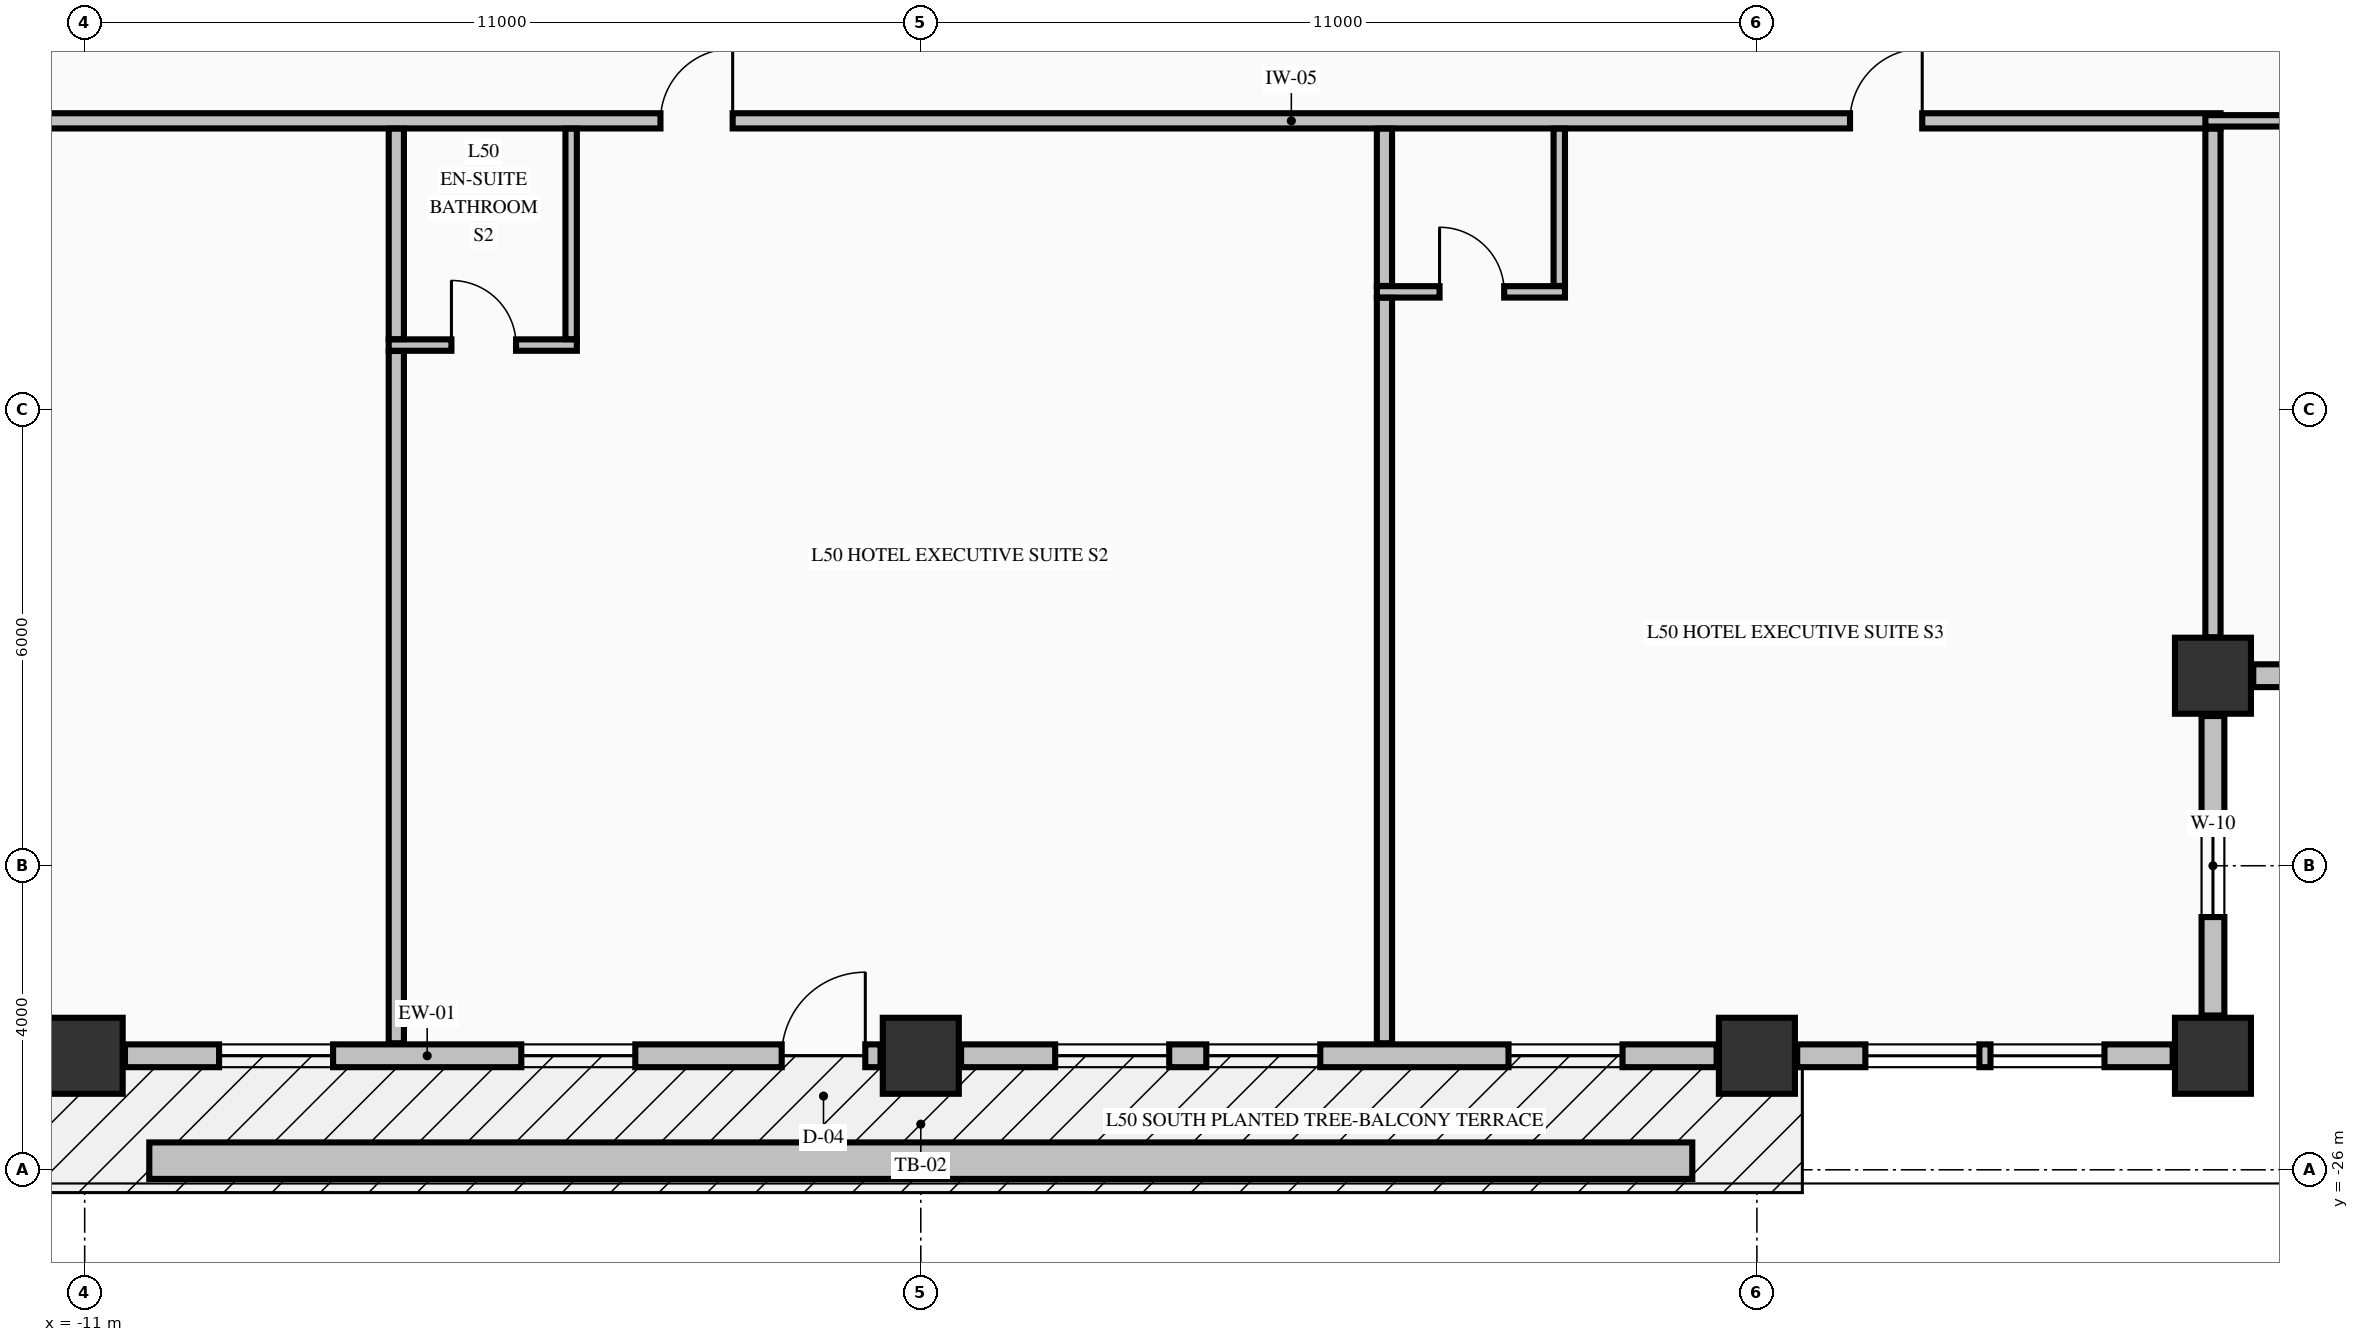
"""IFC4 building model, lengths in metres.
Left out: names, types, materials, properties, quantities, classifications, styles, units other than length and angle.
Written with IfcOpenShell. Run it as: python <this file> out.ifc"""

import sys

from ifc_helpers import new_model, si_unit, direction, frame, frame_2d, origin, origin_2d, place, context, subcontext, project, spatial, rectangle, extrude, element, fill, save


model = new_model("IFC4")
c1 = context("Model", 3, precision=1e-05, world=origin(), true_north=direction((0.0, 1.0)))
c2 = subcontext(c1, "Body", "Model", "MODEL_VIEW")
j1 = project(units=[si_unit("LENGTHUNIT", "METRE"), si_unit("PLANEANGLEUNIT", "RADIAN")], contexts=[c1])
p1 = place(None, origin())
s1 = spatial("IfcSite", under=j1, at=p1, CompositionType="ELEMENT")
p2 = place(p1, origin())
s2 = spatial("IfcBuilding", under=s1, at=p2, CompositionType="ELEMENT")
p3 = place(p2, frame((0.0, 0.0, 194.86)))
s3 = spatial("IfcBuildingStorey", under=s2, at=p3, CompositionType="ELEMENT", Elevation=194.86)
for number, where, z_axis, x_axis in (
    (1, (-11.0, -24.5, -0.275), (0.0, 0.0, 1.0), (1.0, 0.0, 0.0)),
    (2, (0.0, -24.5, -0.275), (0.0, 0.0, 1.0), (1.0, 0.0, 0.0)),
    (3, (11.0, -24.5, -0.275), (0.0, 0.0, 1.0), (1.0, 0.0, 0.0)),
    (4, (17.0, -24.5, -0.275), (0.0, 0.0, 1.0), (1.0, 0.0, 0.0)),
    (5, (17.0, -19.5, -0.275), (0.0, 0.0, 1.0), (1.0, 0.0, 0.0)),
):
    element("IfcColumn", number, at=place(p3, frame(where, z_axis=z_axis, x_axis=x_axis)), inside=s3, PredefinedType="COLUMN", context=c2, shape_type="SweptSolid", body=[
        extrude(rectangle(XDim=1.0, YDim=1.0, at=origin_2d()), origin(), (0.0, 0.0, 1.0), 3.425),
    ])
p4 = place(p3, frame((17.0, -23.97, 0.0), z_axis=(0.0, 0.0, 1.0), x_axis=(0.0, 1.0, 0.0)))
e6 = element("IfcWall", 6, at=p4, inside=s3, PredefinedType="STANDARD", context=c2, shape_type="SweptSolid", body=[
    extrude(rectangle(XDim=3.94, YDim=0.3, at=frame_2d((1.97, 0.0))), origin(), (0.0, 0.0, 1.0), 2.542),
])
p5 = place(p4, frame((1.295, 0.0, 0.68)))
e7 = element("IfcOpeningElement", 7, at=p5, cuts=e6, PredefinedType="OPENING", context=c2, shape_type="SweptSolid", body=[
    extrude(rectangle(XDim=1.35, YDim=1.42, at=frame_2d((0.675, 0.71))), frame((0.0, 0.16, 0.0), z_axis=(0.0, -1.0, 0.0), x_axis=(1.0, 0.0, 0.0)), (0.0, 0.0, 1.0), 0.32),
])
p6 = place(p3, frame((17.53, -19.5, 0.0), z_axis=(0.0, 0.0, 1.0), x_axis=(1.0, 0.0, 0.0)))
e8 = element("IfcWall", 8, at=p6, inside=s3, PredefinedType="STANDARD", context=c2, shape_type="SweptSolid", body=[
    extrude(rectangle(XDim=3.94, YDim=0.3, at=frame_2d((1.97, 0.0))), origin(), (0.0, 0.0, 1.0), 2.542),
])
p7 = place(p6, frame((1.295, 0.0, 0.68)))
e9 = element("IfcOpeningElement", 9, at=p7, cuts=e8, PredefinedType="OPENING", context=c2, shape_type="SweptSolid", body=[
    extrude(rectangle(XDim=1.35, YDim=1.42, at=frame_2d((0.675, 0.71))), frame((0.0, 0.16, 0.0), z_axis=(0.0, -1.0, 0.0), x_axis=(1.0, 0.0, 0.0)), (0.0, 0.0, 1.0), 0.32),
])
p8 = place(p3, frame((-10.47, -24.5, 0.0), z_axis=(0.0, 0.0, 1.0), x_axis=(1.0, 0.0, 0.0)))
e10 = element("IfcWall", 10, at=p8, inside=s3, PredefinedType="STANDARD", context=c2, shape_type="SweptSolid", body=[
    extrude(rectangle(XDim=9.94, YDim=0.3, at=frame_2d((4.97, 0.0))), origin(), (0.0, 0.0, 1.0), 2.542),
])
p9 = place(p8, frame((8.64, 0.0, 0.0)))
e11 = element("IfcOpeningElement", 11, at=p9, cuts=e10, PredefinedType="OPENING", context=c2, shape_type="SweptSolid", body=[
    extrude(rectangle(XDim=1.1, YDim=2.15, at=frame_2d((0.55, 1.075))), frame((0.0, 0.16, 0.0), z_axis=(0.0, -1.0, 0.0), x_axis=(1.0, 0.0, 0.0)), (0.0, 0.0, 1.0), 0.32),
])
p10 = place(p8, frame((1.238, 0.0, 0.72)))
e12 = element("IfcOpeningElement", 12, at=p10, cuts=e10, PredefinedType="OPENING", context=c2, shape_type="SweptSolid", body=[
    extrude(rectangle(XDim=1.5, YDim=1.6, at=frame_2d((0.75, 0.8))), frame((0.0, 0.16, 0.0), z_axis=(0.0, -1.0, 0.0), x_axis=(1.0, 0.0, 0.0)), (0.0, 0.0, 1.0), 0.32),
])
p11 = place(p8, frame((5.214, 0.0, 0.72)))
e13 = element("IfcOpeningElement", 13, at=p11, cuts=e10, PredefinedType="OPENING", context=c2, shape_type="SweptSolid", body=[
    extrude(rectangle(XDim=1.5, YDim=1.6, at=frame_2d((0.75, 0.8))), frame((0.0, 0.16, 0.0), z_axis=(0.0, -1.0, 0.0), x_axis=(1.0, 0.0, 0.0)), (0.0, 0.0, 1.0), 0.32),
])
p12 = place(p3, frame((0.53, -24.5, 0.0), z_axis=(0.0, 0.0, 1.0), x_axis=(1.0, 0.0, 0.0)))
e14 = element("IfcWall", 14, at=p12, inside=s3, PredefinedType="STANDARD", context=c2, shape_type="SweptSolid", body=[
    extrude(rectangle(XDim=9.94, YDim=0.3, at=frame_2d((4.97, 0.0))), origin(), (0.0, 0.0, 1.0), 2.542),
])
p13 = place(p12, frame((1.238, 0.0, 0.72)))
e15 = element("IfcOpeningElement", 15, at=p13, cuts=e14, PredefinedType="OPENING", context=c2, shape_type="SweptSolid", body=[
    extrude(rectangle(XDim=1.5, YDim=1.6, at=frame_2d((0.75, 0.8))), frame((0.0, 0.16, 0.0), z_axis=(0.0, -1.0, 0.0), x_axis=(1.0, 0.0, 0.0)), (0.0, 0.0, 1.0), 0.32),
])
p14 = place(p12, frame((3.226, 0.0, 0.72)))
e16 = element("IfcOpeningElement", 16, at=p14, cuts=e14, PredefinedType="OPENING", context=c2, shape_type="SweptSolid", body=[
    extrude(rectangle(XDim=1.5, YDim=1.6, at=frame_2d((0.75, 0.8))), frame((0.0, 0.16, 0.0), z_axis=(0.0, -1.0, 0.0), x_axis=(1.0, 0.0, 0.0)), (0.0, 0.0, 1.0), 0.32),
])
p15 = place(p12, frame((7.202, 0.0, 0.72)))
e17 = element("IfcOpeningElement", 17, at=p15, cuts=e14, PredefinedType="OPENING", context=c2, shape_type="SweptSolid", body=[
    extrude(rectangle(XDim=1.5, YDim=1.6, at=frame_2d((0.75, 0.8))), frame((0.0, 0.16, 0.0), z_axis=(0.0, -1.0, 0.0), x_axis=(1.0, 0.0, 0.0)), (0.0, 0.0, 1.0), 0.32),
])
p16 = place(p3, frame((11.53, -24.5, 0.0), z_axis=(0.0, 0.0, 1.0), x_axis=(1.0, 0.0, 0.0)))
e18 = element("IfcWall", 18, at=p16, inside=s3, PredefinedType="STANDARD", context=c2, shape_type="SweptSolid", body=[
    extrude(rectangle(XDim=4.94, YDim=0.3, at=frame_2d((2.47, 0.0))), origin(), (0.0, 0.0, 1.0), 2.542),
])
p17 = place(p16, frame((0.897, 0.0, 0.72)))
e19 = element("IfcOpeningElement", 19, at=p17, cuts=e18, PredefinedType="OPENING", context=c2, shape_type="SweptSolid", body=[
    extrude(rectangle(XDim=1.5, YDim=1.6, at=frame_2d((0.75, 0.8))), frame((0.0, 0.16, 0.0), z_axis=(0.0, -1.0, 0.0), x_axis=(1.0, 0.0, 0.0)), (0.0, 0.0, 1.0), 0.32),
])
p18 = place(p16, frame((2.543, 0.0, 0.72)))
e20 = element("IfcOpeningElement", 20, at=p18, cuts=e18, PredefinedType="OPENING", context=c2, shape_type="SweptSolid", body=[
    extrude(rectangle(XDim=1.5, YDim=1.6, at=frame_2d((0.75, 0.8))), frame((0.0, 0.16, 0.0), z_axis=(0.0, -1.0, 0.0), x_axis=(1.0, 0.0, 0.0)), (0.0, 0.0, 1.0), 0.32),
])
p19 = place(p3, frame((-7.0, -15.15, 0.0), z_axis=(0.0, 0.0, 1.0), x_axis=(1.0, 0.0, 0.0)))
e21 = element("IfcWall", 21, at=p19, inside=s3, PredefinedType="PARTITIONING", context=c2, shape_type="SweptSolid", body=[
    extrude(rectangle(XDim=2.475, YDim=0.15, at=frame_2d((1.238, 0.0))), origin(), (0.0, 0.0, 1.0), 3.15),
])
p20 = place(p19, frame((0.825, 0.0, 0.0)))
e22 = element("IfcOpeningElement", 22, at=p20, cuts=e21, PredefinedType="OPENING", context=c2, shape_type="SweptSolid", body=[
    extrude(rectangle(XDim=0.85, YDim=2.1, at=frame_2d((0.425, 1.05))), frame((0.0, 0.085, 0.0), z_axis=(0.0, -1.0, 0.0), x_axis=(1.0, 0.0, 0.0)), (0.0, 0.0, 1.0), 0.17),
])
p21 = place(p3, frame((6.0, -14.45, 0.0), z_axis=(0.0, 0.0, 1.0), x_axis=(1.0, 0.0, 0.0)))
e23 = element("IfcWall", 23, at=p21, inside=s3, PredefinedType="PARTITIONING", context=c2, shape_type="SweptSolid", body=[
    extrude(rectangle(XDim=2.475, YDim=0.15, at=frame_2d((1.238, 0.0))), origin(), (0.0, 0.0, 1.0), 3.15),
])
p22 = place(p21, frame((0.825, 0.0, 0.0)))
e24 = element("IfcOpeningElement", 24, at=p22, cuts=e23, PredefinedType="OPENING", context=c2, shape_type="SweptSolid", body=[
    extrude(rectangle(XDim=0.85, YDim=2.1, at=frame_2d((0.425, 1.05))), frame((0.0, 0.085, 0.0), z_axis=(0.0, -1.0, 0.0), x_axis=(1.0, 0.0, 0.0)), (0.0, 0.0, 1.0), 0.17),
])
p23 = place(p3, frame((-22.1, -12.2, 0.0), z_axis=(0.0, 0.0, 1.0), x_axis=(1.0, 0.0, 0.0)))
e25 = element("IfcWall", 25, at=p23, inside=s3, PredefinedType="PARTITIONING", context=c2, shape_type="SweptSolid", body=[
    extrude(rectangle(XDim=39.2, YDim=0.2, at=frame_2d((19.6, 0.0))), origin(), (0.0, 0.0, 1.0), 3.15),
])
p24 = place(p23, frame((8.225, 0.0, 0.0)))
e26 = element("IfcOpeningElement", 26, at=p24, cuts=e25, PredefinedType="OPENING", context=c2, shape_type="SweptSolid", body=[
    extrude(rectangle(XDim=1.05, YDim=2.15, at=frame_2d((0.525, 1.075))), frame((0.0, 0.11, 0.0), z_axis=(0.0, -1.0, 0.0), x_axis=(1.0, 0.0, 0.0)), (0.0, 0.0, 1.0), 0.22),
])
p25 = place(p23, frame((18.675, 0.0, 0.0)))
e27 = element("IfcOpeningElement", 27, at=p25, cuts=e25, PredefinedType="OPENING", context=c2, shape_type="SweptSolid", body=[
    extrude(rectangle(XDim=0.95, YDim=2.15, at=frame_2d((0.475, 1.075))), frame((0.0, 0.11, 0.0), z_axis=(0.0, -1.0, 0.0), x_axis=(1.0, 0.0, 0.0)), (0.0, 0.0, 1.0), 0.22),
])
p26 = place(p23, frame((34.325, 0.0, 0.0)))
e28 = element("IfcOpeningElement", 28, at=p26, cuts=e25, PredefinedType="OPENING", context=c2, shape_type="SweptSolid", body=[
    extrude(rectangle(XDim=0.95, YDim=2.15, at=frame_2d((0.475, 1.075))), frame((0.0, 0.11, 0.0), z_axis=(0.0, -1.0, 0.0), x_axis=(1.0, 0.0, 0.0)), (0.0, 0.0, 1.0), 0.22),
])
p27 = place(p3, frame((16.9, -12.2, 0.0), z_axis=(0.0, 0.0, 1.0), x_axis=(1.0, 0.0, 0.0)))
e29 = element("IfcWall", 29, at=p27, inside=s3, PredefinedType="PARTITIONING", context=c2, shape_type="SweptSolid", body=[
    extrude(rectangle(XDim=3.175, YDim=0.15, at=frame_2d((1.587, 0.0))), origin(), (0.0, 0.0, 1.0), 3.15),
])
p28 = place(p3, frame((-6.9, -24.335, 0.0), z_axis=(0.0, 0.0, 1.0), x_axis=(0.0, 1.0, 0.0)))
e30 = element("IfcWall", 30, at=p28, inside=s3, PredefinedType="PARTITIONING", context=c2, shape_type="SweptSolid", body=[
    extrude(rectangle(XDim=9.107, YDim=0.2, at=frame_2d((4.553, 0.0))), origin(), (0.0, 0.0, 1.0), 3.15),
])
p29 = place(p3, frame((-6.9, -15.072, 0.0), z_axis=(0.0, 0.0, 1.0), x_axis=(0.0, 1.0, 0.0)))
e31 = element("IfcWall", 31, at=p29, inside=s3, PredefinedType="PARTITIONING", context=c2, shape_type="SweptSolid", body=[
    extrude(rectangle(XDim=2.769, YDim=0.2, at=frame_2d((1.385, 0.0))), origin(), (0.0, 0.0, 1.0), 3.15),
])
p30 = place(p3, frame((-4.6, -15.072, 0.0), z_axis=(0.0, 0.0, 1.0), x_axis=(0.0, 1.0, 0.0)))
e32 = element("IfcWall", 32, at=p30, inside=s3, PredefinedType="PARTITIONING", context=c2, shape_type="SweptSolid", body=[
    extrude(rectangle(XDim=2.769, YDim=0.15, at=frame_2d((1.385, 0.0))), origin(), (0.0, 0.0, 1.0), 3.15),
])
p31 = place(p3, frame((6.1, -24.335, 0.0), z_axis=(0.0, 0.0, 1.0), x_axis=(0.0, 1.0, 0.0)))
e33 = element("IfcWall", 33, at=p31, inside=s3, PredefinedType="PARTITIONING", context=c2, shape_type="SweptSolid", body=[
    extrude(rectangle(XDim=9.807, YDim=0.2, at=frame_2d((4.903, 0.0))), origin(), (0.0, 0.0, 1.0), 3.15),
])
p32 = place(p3, frame((6.1, -14.372, 0.0), z_axis=(0.0, 0.0, 1.0), x_axis=(0.0, 1.0, 0.0)))
e34 = element("IfcWall", 34, at=p32, inside=s3, PredefinedType="PARTITIONING", context=c2, shape_type="SweptSolid", body=[
    extrude(rectangle(XDim=2.069, YDim=0.2, at=frame_2d((1.035, 0.0))), origin(), (0.0, 0.0, 1.0), 3.15),
])
p33 = place(p3, frame((8.4, -14.372, 0.0), z_axis=(0.0, 0.0, 1.0), x_axis=(0.0, 1.0, 0.0)))
e35 = element("IfcWall", 35, at=p33, inside=s3, PredefinedType="PARTITIONING", context=c2, shape_type="SweptSolid", body=[
    extrude(rectangle(XDim=2.069, YDim=0.15, at=frame_2d((1.035, 0.0))), origin(), (0.0, 0.0, 1.0), 3.15),
])
p34 = place(p3, frame((17.0, -18.994, 0.0), z_axis=(0.0, 0.0, 1.0), x_axis=(0.0, 1.0, 0.0)))
e36 = element("IfcWall", 36, at=p34, inside=s3, PredefinedType="PARTITIONING", context=c2, shape_type="SweptSolid", body=[
    extrude(rectangle(XDim=6.691, YDim=0.2, at=frame_2d((3.345, 0.0))), origin(), (0.0, 0.0, 1.0), 3.15),
])
p35 = place(p3, frame((-10.15, -25.88, -0.04), z_axis=(0.0, 0.0, 1.0), x_axis=(1.0, 0.0, 0.0)))
e37 = element("IfcWall", 37, at=p35, inside=s3, PredefinedType="PARAPET", context=c2, shape_type="SweptSolid", body=[
    extrude(rectangle(XDim=20.3, YDim=0.48, at=frame_2d((10.15, 0.0))), origin(), (0.0, 0.0, 1.0), 0.52),
])
p36 = place(p5, origin())
e38 = element("IfcWindow", 38, at=p36, inside=s3, PartitioningType="SINGLE_PANEL", PredefinedType="WINDOW", context=c2, shape_type="SweptSolid", body=[
    extrude(rectangle(XDim=1.35, YDim=1.42, at=frame_2d((0.675, 0.71))), frame((0.0, 0.03, 0.0), z_axis=(0.0, -1.0, 0.0), x_axis=(1.0, 0.0, 0.0)), (0.0, 0.0, 1.0), 0.06),
])
fill(e7, e38)
p37 = place(p9, origin())
e39 = element("IfcDoor", 39, at=p37, inside=s3, OperationType="SINGLE_SWING_RIGHT", PredefinedType="DOOR", context=c2, shape_type="SweptSolid", body=[
    extrude(rectangle(XDim=1.1, YDim=2.15, at=frame_2d((0.55, 1.075))), frame((0.0, 0.025, 0.0), z_axis=(0.0, -1.0, 0.0), x_axis=(1.0, 0.0, 0.0)), (0.0, 0.0, 1.0), 0.05),
])
fill(e11, e39)
p38 = place(p10, origin())
e40 = element("IfcWindow", 40, at=p38, inside=s3, PartitioningType="SINGLE_PANEL", PredefinedType="WINDOW", context=c2, shape_type="SweptSolid", body=[
    extrude(rectangle(XDim=1.5, YDim=1.6, at=frame_2d((0.75, 0.8))), frame((0.0, 0.03, 0.0), z_axis=(0.0, -1.0, 0.0), x_axis=(1.0, 0.0, 0.0)), (0.0, 0.0, 1.0), 0.06),
])
fill(e12, e40)
p39 = place(p11, origin())
e41 = element("IfcWindow", 41, at=p39, inside=s3, PartitioningType="SINGLE_PANEL", PredefinedType="WINDOW", context=c2, shape_type="SweptSolid", body=[
    extrude(rectangle(XDim=1.5, YDim=1.6, at=frame_2d((0.75, 0.8))), frame((0.0, 0.03, 0.0), z_axis=(0.0, -1.0, 0.0), x_axis=(1.0, 0.0, 0.0)), (0.0, 0.0, 1.0), 0.06),
])
fill(e13, e41)
p40 = place(p13, origin())
e42 = element("IfcWindow", 42, at=p40, inside=s3, PartitioningType="SINGLE_PANEL", PredefinedType="WINDOW", context=c2, shape_type="SweptSolid", body=[
    extrude(rectangle(XDim=1.5, YDim=1.6, at=frame_2d((0.75, 0.8))), frame((0.0, 0.03, 0.0), z_axis=(0.0, -1.0, 0.0), x_axis=(1.0, 0.0, 0.0)), (0.0, 0.0, 1.0), 0.06),
])
fill(e15, e42)
p41 = place(p14, origin())
e43 = element("IfcWindow", 43, at=p41, inside=s3, PartitioningType="SINGLE_PANEL", PredefinedType="WINDOW", context=c2, shape_type="SweptSolid", body=[
    extrude(rectangle(XDim=1.5, YDim=1.6, at=frame_2d((0.75, 0.8))), frame((0.0, 0.03, 0.0), z_axis=(0.0, -1.0, 0.0), x_axis=(1.0, 0.0, 0.0)), (0.0, 0.0, 1.0), 0.06),
])
fill(e16, e43)
p42 = place(p15, origin())
e44 = element("IfcWindow", 44, at=p42, inside=s3, PartitioningType="SINGLE_PANEL", PredefinedType="WINDOW", context=c2, shape_type="SweptSolid", body=[
    extrude(rectangle(XDim=1.5, YDim=1.6, at=frame_2d((0.75, 0.8))), frame((0.0, 0.03, 0.0), z_axis=(0.0, -1.0, 0.0), x_axis=(1.0, 0.0, 0.0)), (0.0, 0.0, 1.0), 0.06),
])
fill(e17, e44)
p43 = place(p17, origin())
e45 = element("IfcWindow", 45, at=p43, inside=s3, PartitioningType="SINGLE_PANEL", PredefinedType="WINDOW", context=c2, shape_type="SweptSolid", body=[
    extrude(rectangle(XDim=1.5, YDim=1.6, at=frame_2d((0.75, 0.8))), frame((0.0, 0.03, 0.0), z_axis=(0.0, -1.0, 0.0), x_axis=(1.0, 0.0, 0.0)), (0.0, 0.0, 1.0), 0.06),
])
fill(e19, e45)
p44 = place(p18, origin())
e46 = element("IfcWindow", 46, at=p44, inside=s3, PartitioningType="SINGLE_PANEL", PredefinedType="WINDOW", context=c2, shape_type="SweptSolid", body=[
    extrude(rectangle(XDim=1.5, YDim=1.6, at=frame_2d((0.75, 0.8))), frame((0.0, 0.03, 0.0), z_axis=(0.0, -1.0, 0.0), x_axis=(1.0, 0.0, 0.0)), (0.0, 0.0, 1.0), 0.06),
])
fill(e20, e46)
p45 = place(p25, origin())
e47 = element("IfcDoor", 47, at=p45, inside=s3, OperationType="SINGLE_SWING_RIGHT", PredefinedType="DOOR", context=c2, shape_type="SweptSolid", body=[
    extrude(rectangle(XDim=0.95, YDim=2.15, at=frame_2d((0.475, 1.075))), frame((0.0, 0.025, 0.0), z_axis=(0.0, -1.0, 0.0), x_axis=(1.0, 0.0, 0.0)), (0.0, 0.0, 1.0), 0.05),
])
fill(e27, e47)
p46 = place(p20, origin())
e48 = element("IfcDoor", 48, at=p46, inside=s3, OperationType="SINGLE_SWING_LEFT", PredefinedType="DOOR", context=c2, shape_type="SweptSolid", body=[
    extrude(rectangle(XDim=0.85, YDim=2.1, at=frame_2d((0.425, 1.05))), frame((0.0, 0.025, 0.0), z_axis=(0.0, -1.0, 0.0), x_axis=(1.0, 0.0, 0.0)), (0.0, 0.0, 1.0), 0.05),
])
fill(e22, e48)
p47 = place(p26, origin())
e49 = element("IfcDoor", 49, at=p47, inside=s3, OperationType="SINGLE_SWING_RIGHT", PredefinedType="DOOR", context=c2, shape_type="SweptSolid", body=[
    extrude(rectangle(XDim=0.95, YDim=2.15, at=frame_2d((0.475, 1.075))), frame((0.0, 0.025, 0.0), z_axis=(0.0, -1.0, 0.0), x_axis=(1.0, 0.0, 0.0)), (0.0, 0.0, 1.0), 0.05),
])
fill(e28, e49)
p48 = place(p22, origin())
e50 = element("IfcDoor", 50, at=p48, inside=s3, OperationType="SINGLE_SWING_LEFT", PredefinedType="DOOR", context=c2, shape_type="SweptSolid", body=[
    extrude(rectangle(XDim=0.85, YDim=2.1, at=frame_2d((0.425, 1.05))), frame((0.0, 0.025, 0.0), z_axis=(0.0, -1.0, 0.0), x_axis=(1.0, 0.0, 0.0)), (0.0, 0.0, 1.0), 0.05),
])
fill(e24, e50)
save(model, sys.argv[1])
